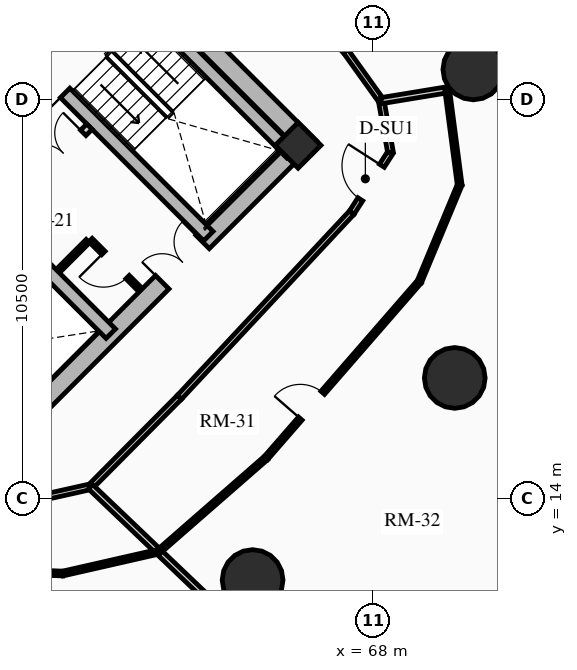
"""IFC4 building model, lengths in metres.
Left out: names, types, materials, properties, quantities, classifications, styles, units other than length and angle.
Written with IfcOpenShell. Run it as: python <this file> out.ifc"""

import sys

from ifc_helpers import new_model, si_unit, direction, frame, frame_2d, origin, origin_2d, place, context, subcontext, project, spatial, rectangle, circle, extrude, source, transform, mapped, element, fill, save


model = new_model("IFC4")
c1 = context("Model", 3, precision=1e-05, world=origin(), true_north=direction((0.0, 1.0)))
c2 = subcontext(c1, "Body", "Model", "MODEL_VIEW")
j1 = project(units=[si_unit("LENGTHUNIT", "METRE"), si_unit("PLANEANGLEUNIT", "RADIAN")], contexts=[c1])
p1 = place(None, origin())
s1 = spatial("IfcSite", under=j1, at=p1, CompositionType="ELEMENT")
p2 = place(p1, origin())
s2 = spatial("IfcBuilding", under=s1, at=p2, CompositionType="ELEMENT")
p3 = place(p2, frame((0.0, 0.0, 56.92)))
s3 = spatial("IfcBuildingStorey", under=s2, at=p3, CompositionType="ELEMENT", Elevation=56.92)
p4 = place(p3, frame((66.339, 23.227, 0.0), z_axis=(0.0, 0.0, 1.0), x_axis=(-0.707106781187, 0.707106781187, 0.0)))
e1 = element("IfcWall", 1, at=p4, inside=s3, PredefinedType="SHEAR", context=c2, shape_type="SweptSolid", body=[
    extrude(rectangle(XDim=14.3, YDim=0.5, at=frame_2d((7.15, 0.0))), origin(), (0.0, 0.0, 1.0), 2.91),
])
p5 = place(p3, frame((58.596, 15.838, 0.0), z_axis=(0.0, 0.0, 1.0), x_axis=(0.707106781187, 0.707106781187, 0.0)))
e2 = element("IfcWall", 2, at=p5, inside=s3, PredefinedType="SHEAR", context=c2, shape_type="SweptSolid", body=[
    extrude(rectangle(XDim=10.7, YDim=0.5, at=frame_2d((5.35, 0.0))), origin(), (0.0, 0.0, 1.0), 2.91),
])
m1 = source(origin(), c2, "Body", "SweptSolid", [
    extrude(rectangle(XDim=1.5, YDim=2.02, at=frame_2d((0.75, 1.01))), frame((0.0, 0.26, 0.0), z_axis=(0.0, -1.0, 0.0), x_axis=(1.0, 0.0, 0.0)), (0.0, 0.0, 1.0), 0.52),
])
p6 = place(p5, frame((5.45, 0.0, 0.0)))
e3 = element("IfcOpeningElement", 3, at=p6, cuts=e2, PredefinedType="OPENING", context=c2, shape_type="MappedRepresentation", body=[
    mapped(m1, transform((0.0, 0.0, 0.0), x_axis=(1.0, 0.0, 0.0), y_axis=(0.0, 1.0, 0.0), z_axis=(0.0, 0.0, 1.0), scale=1.0)),
])
p7 = place(p3, frame((61.096, 18.338, 0.0), z_axis=(0.0, 0.0, 1.0), x_axis=(-0.707106781187, 0.707106781187, 0.0)))
e4 = element("IfcWall", 4, at=p7, inside=s3, PredefinedType="SHEAR", context=c2, shape_type="SweptSolid", body=[
    extrude(rectangle(XDim=13.8, YDim=0.35, at=frame_2d((6.9, 0.0))), origin(), (0.0, 0.0, 1.0), 2.91),
])
m2 = source(origin(), c2, "Body", "SweptSolid", [
    extrude(rectangle(XDim=1.1, YDim=2.015, at=frame_2d((0.55, 1.007))), frame((0.0, 0.185, 0.0), z_axis=(0.0, -1.0, 0.0), x_axis=(1.0, 0.0, 0.0)), (0.0, 0.0, 1.0), 0.37),
])
p8 = place(p7, frame((4.9, 0.0, 0.0)))
e5 = element("IfcOpeningElement", 5, at=p8, cuts=e4, PredefinedType="OPENING", context=c2, shape_type="MappedRepresentation", body=[
    mapped(m2, transform((0.0, 0.0, 0.0), x_axis=(1.0, 0.0, 0.0), y_axis=(0.0, 1.0, 0.0), z_axis=(0.0, 0.0, 1.0), scale=1.0)),
])
m3 = source(origin(), c2, "Body", "SweptSolid", [
    extrude(rectangle(XDim=1.15, YDim=2.02, at=frame_2d((0.575, 1.01))), frame((0.0, 0.185, 0.0), z_axis=(0.0, -1.0, 0.0), x_axis=(1.0, 0.0, 0.0)), (0.0, 0.0, 1.0), 0.37),
])
p9 = place(p7, frame((7.32, 0.0, 0.0)))
e6 = element("IfcOpeningElement", 6, at=p9, cuts=e4, PredefinedType="OPENING", context=c2, shape_type="MappedRepresentation", body=[
    mapped(m3, transform((0.0, 0.0, 0.0), x_axis=(1.0, 0.0, 0.0), y_axis=(0.0, 1.0, 0.0), z_axis=(0.0, 0.0, 1.0), scale=1.0)),
])
p10 = place(p3, frame((63.662, 20.904, 0.0), z_axis=(0.0, 0.0, 1.0), x_axis=(-0.707106781187, 0.707106781187, 0.0)))
e7 = element("IfcWall", 7, at=p10, inside=s3, PredefinedType="SHEAR", context=c2, shape_type="SweptSolid", body=[
    extrude(rectangle(XDim=13.8, YDim=0.35, at=frame_2d((6.9, 0.0))), origin(), (0.0, 0.0, 1.0), 2.91),
])
p11 = place(p10, frame((10.025, 0.0, 0.0)))
e8 = element("IfcOpeningElement", 8, at=p11, cuts=e7, PredefinedType="OPENING", context=c2, shape_type="MappedRepresentation", body=[
    mapped(m2, transform((0.0, 0.0, 0.0), x_axis=(1.0, 0.0, 0.0), y_axis=(0.0, 1.0, 0.0), z_axis=(0.0, 0.0, 1.0), scale=1.0)),
])
p12 = place(p10, frame((12.025, 0.0, 0.0)))
e9 = element("IfcOpeningElement", 9, at=p12, cuts=e7, PredefinedType="OPENING", context=c2, shape_type="MappedRepresentation", body=[
    mapped(m2, transform((0.0, 0.0, 0.0), x_axis=(1.0, 0.0, 0.0), y_axis=(0.0, 1.0, 0.0), z_axis=(0.0, 0.0, 1.0), scale=1.0)),
])
p13 = place(p10, frame((5.33, 0.0, 0.0)))
e10 = element("IfcOpeningElement", 10, at=p13, cuts=e7, PredefinedType="OPENING", context=c2, shape_type="MappedRepresentation", body=[
    mapped(m3, transform((0.0, 0.0, 0.0), x_axis=(1.0, 0.0, 0.0), y_axis=(0.0, 1.0, 0.0), z_axis=(0.0, 0.0, 1.0), scale=1.0)),
])
p14 = place(p3, frame((65.847, 23.089, 0.0), z_axis=(0.0, 0.0, 1.0), x_axis=(-0.707106781187, 0.707106781187, 0.0)))
e11 = element("IfcWall", 11, at=p14, inside=s3, PredefinedType="SHEAR", context=c2, shape_type="SweptSolid", body=[
    extrude(rectangle(XDim=6.745, YDim=0.35, at=frame_2d((3.373, 0.0))), origin(), (0.0, 0.0, 1.0), 2.91),
])
p15 = place(p3, frame((58.893, 25.674, 0.0), z_axis=(0.0, 0.0, 1.0), x_axis=(0.707106781187, 0.707106781187, 0.0)))
e12 = element("IfcWall", 12, at=p15, inside=s3, PredefinedType="SHEAR", context=c2, shape_type="SweptSolid", body=[
    extrude(rectangle(XDim=3.285, YDim=0.35, at=frame_2d((1.643, 0.0))), origin(), (0.0, 0.0, 1.0), 2.91),
])
p16 = place(p3, frame((66.024, 23.294, 0.0), z_axis=(0.0, 0.0, 1.0), x_axis=(0.707106781187, 0.707106781187, 0.0)))
e13 = element("IfcColumn", 13, at=p16, inside=s3, PredefinedType="COLUMN", context=c2, shape_type="SweptSolid", body=[
    extrude(rectangle(XDim=0.85, YDim=0.85, at=origin_2d()), origin(), (0.0, 0.0, 1.0), 2.91),
])
for number, where, z_axis, x_axis in (
    (14, (64.827, 11.854, 0.0), (0.0, 0.0, 1.0), (1.0, 0.0, 0.0)),
    (15, (70.146, 17.173, 0.0), (0.0, 0.0, 1.0), (1.0, 0.0, 0.0)),
    (16, (70.635, 25.291, 0.0), (0.0, 0.0, 1.0), (1.0, 0.0, 0.0)),
):
    element("IfcColumn", number, at=place(p3, frame(where, z_axis=z_axis, x_axis=x_axis)), inside=s3, PredefinedType="USERDEFINED", context=c2, shape_type="SweptSolid", body=[
        extrude(circle(Radius=0.8, at=origin_2d()), origin(), (0.0, 0.0, 1.0), 2.91),
    ])
p17 = place(p3, frame((73.814, 15.031, 0.0), z_axis=(0.0, 0.0, 1.0), x_axis=(-0.559638693991, -0.828736708604, 0.0)))
e17 = element("IfcWall", 17, at=p17, inside=s3, PredefinedType="SOLIDWALL", context=c2, shape_type="SweptSolid", body=[
    extrude(rectangle(XDim=4.93, YDim=0.24, at=frame_2d((2.465, 0.0))), origin(), (0.0, 0.0, 1.0), 2.073),
])
m4 = source(origin(), c2, "Body", "SweptSolid", [
    extrude(rectangle(XDim=1.9, YDim=1.35, at=frame_2d((0.95, 0.675))), frame((0.0, 0.13, 0.0), z_axis=(0.0, -1.0, 0.0), x_axis=(1.0, 0.0, 0.0)), (0.0, 0.0, 1.0), 0.26),
])
p18 = place(p17, frame((1.515, 0.0, 0.65)))
e18 = element("IfcOpeningElement", 18, at=p18, cuts=e17, PredefinedType="OPENING", context=c2, shape_type="MappedRepresentation", body=[
    mapped(m4, transform((0.0, 0.0, 0.0), x_axis=(1.0, 0.0, 0.0), y_axis=(0.0, 1.0, 0.0), z_axis=(0.0, 0.0, 1.0), scale=1.0)),
])
p19 = place(p3, frame((58.214, 21.467, 0.0), z_axis=(0.0, 0.0, 1.0), x_axis=(0.707106781187, 0.707106781187, 0.0)))
e19 = element("IfcWall", 19, at=p19, inside=s3, PredefinedType="PARTITIONING", context=c2, shape_type="SweptSolid", body=[
    extrude(rectangle(XDim=3.28, YDim=0.2, at=frame_2d((1.64, 0.0))), origin(), (0.0, 0.0, 1.0), 2.635),
])
m5 = source(origin(), c2, "Body", "SweptSolid", [
    extrude(rectangle(XDim=1.5, YDim=2.02, at=frame_2d((0.75, 1.01))), frame((0.0, 0.11, 0.0), z_axis=(0.0, -1.0, 0.0), x_axis=(1.0, 0.0, 0.0)), (0.0, 0.0, 1.0), 0.22),
])
p20 = place(p19, frame((1.55, 0.0, 0.0)))
e20 = element("IfcOpeningElement", 20, at=p20, cuts=e19, PredefinedType="OPENING", context=c2, shape_type="MappedRepresentation", body=[
    mapped(m5, transform((0.0, 0.0, 0.0), x_axis=(1.0, 0.0, 0.0), y_axis=(0.0, 1.0, 0.0), z_axis=(0.0, 0.0, 1.0), scale=1.0)),
])
p21 = place(p3, frame((61.835, 19.529, 0.0), z_axis=(0.0, 0.0, 1.0), x_axis=(-0.707174592913, 0.707038962956, 0.0)))
e21 = element("IfcWall", 21, at=p21, inside=s3, PredefinedType="PARTITIONING", context=c2, shape_type="SweptSolid", body=[
    extrude(rectangle(XDim=1.8, YDim=0.125, at=frame_2d((0.9, 0.0))), origin(), (0.0, 0.0, 1.0), 2.635),
])
m6 = source(origin(), c2, "Body", "SweptSolid", [
    extrude(rectangle(XDim=0.9, YDim=2.005, at=frame_2d((0.45, 1.002))), frame((0.0, 0.073, 0.0), z_axis=(0.0, -1.0, 0.0), x_axis=(1.0, 0.0, 0.0)), (0.0, 0.0, 1.0), 0.145),
])
p22 = place(p21, frame((0.42, 0.0, 0.0)))
e22 = element("IfcOpeningElement", 22, at=p22, cuts=e21, PredefinedType="OPENING", context=c2, shape_type="MappedRepresentation", body=[
    mapped(m6, transform((0.0, 0.0, 0.0), x_axis=(1.0, 0.0, 0.0), y_axis=(0.0, 1.0, 0.0), z_axis=(0.0, 0.0, 1.0), scale=1.0)),
])
p23 = place(p3, frame((59.713, 19.996, 0.0), z_axis=(0.0, 0.0, 1.0), x_axis=(0.707217726, 0.706995818963, 0.0)))
e23 = element("IfcWall", 23, at=p23, inside=s3, PredefinedType="PARTITIONING", context=c2, shape_type="SweptSolid", body=[
    extrude(rectangle(XDim=1.1, YDim=0.125, at=frame_2d((0.55, 0.0))), origin(), (0.0, 0.0, 1.0), 2.635),
])
p24 = place(p3, frame((59.008, 13.963, 0.0), z_axis=(0.0, 0.0, 1.0), x_axis=(0.976020856791, 0.21767702476, 0.0)))
e24 = element("IfcWall", 24, at=p24, inside=s3, PredefinedType="PARTITIONING", context=c2, shape_type="SweptSolid", body=[
    extrude(rectangle(XDim=1.593, YDim=0.15, at=frame_2d((0.796, 0.0))), origin(), (0.0, 0.0, 1.0), 2.205),
])
p25 = place(p3, frame((60.562, 14.31, 0.0), z_axis=(0.0, 0.0, 1.0), x_axis=(0.704566236161, 0.709638230975, 0.0)))
e25 = element("IfcWall", 25, at=p25, inside=s3, PredefinedType="PARTITIONING", context=c2, shape_type="SweptSolid", body=[
    extrude(rectangle(XDim=3.321, YDim=0.15, at=frame_2d((1.661, 0.0))), origin(), (0.0, 0.0, 1.0), 2.159),
])
p26 = place(p3, frame((62.903, 16.667, 0.0), z_axis=(0.0, 0.0, 1.0), x_axis=(0.682371947497, 0.731005147225, 0.0)))
e26 = element("IfcWall", 26, at=p26, inside=s3, PredefinedType="PARTITIONING", context=c2, shape_type="SweptSolid", body=[
    extrude(rectangle(XDim=6.642, YDim=0.15, at=frame_2d((3.321, 0.0))), origin(), (0.0, 0.0, 1.0), 2.159),
])
p27 = place(p3, frame((67.435, 21.521, 0.0), z_axis=(0.0, 0.0, 1.0), x_axis=(0.540777197838, 0.841165870859, 0.0)))
e27 = element("IfcWall", 27, at=p27, inside=s3, PredefinedType="PARTITIONING", context=c2, shape_type="SweptSolid", body=[
    extrude(rectangle(XDim=1.888, YDim=0.15, at=frame_2d((0.944, 0.0))), origin(), (0.0, 0.0, 1.0), 2.205),
])
m7 = source(origin(), c2, "Body", "SweptSolid", [
    extrude(rectangle(XDim=1.05, YDim=2.015, at=frame_2d((0.525, 1.007))), frame((0.0, 0.085, 0.0), z_axis=(0.0, -1.0, 0.0), x_axis=(1.0, 0.0, 0.0)), (0.0, 0.0, 1.0), 0.17),
])
p28 = place(p27, frame((0.419, 0.0, 0.0)))
e28 = element("IfcOpeningElement", 28, at=p28, cuts=e27, PredefinedType="OPENING", context=c2, shape_type="MappedRepresentation", body=[
    mapped(m7, transform((0.0, 0.0, 0.0), x_axis=(1.0, 0.0, 0.0), y_axis=(0.0, 1.0, 0.0), z_axis=(0.0, 0.0, 1.0), scale=1.0)),
])
p29 = place(p3, frame((68.456, 23.11, 0.0), z_axis=(0.0, 0.0, 1.0), x_axis=(-0.1772522795, 0.984165448191, 0.0)))
e29 = element("IfcWall", 29, at=p29, inside=s3, PredefinedType="PARTITIONING", context=c2, shape_type="SweptSolid", body=[
    extrude(rectangle(XDim=1.382, YDim=0.15, at=frame_2d((0.691, 0.0))), origin(), (0.0, 0.0, 1.0), 2.159),
])
p30 = place(p3, frame((68.211, 24.469, 0.0), z_axis=(0.0, 0.0, 1.0), x_axis=(-0.583012141368, 0.812463441034, 0.0)))
e30 = element("IfcWall", 30, at=p30, inside=s3, PredefinedType="PARTITIONING", context=c2, shape_type="SweptSolid", body=[
    extrude(rectangle(XDim=1.613, YDim=0.15, at=frame_2d((0.807, 0.0))), origin(), (0.0, 0.0, 1.0), 2.205),
])
p31 = place(p3, frame((67.27, 25.78, 0.0), z_axis=(0.0, 0.0, 1.0), x_axis=(-0.696847842907, 0.717218992942, 0.0)))
e31 = element("IfcWall", 31, at=p31, inside=s3, PredefinedType="PARTITIONING", context=c2, shape_type="SweptSolid", body=[
    extrude(rectangle(XDim=6.004, YDim=0.15, at=frame_2d((3.002, 0.0))), origin(), (0.0, 0.0, 1.0), 2.635),
])
m8 = source(origin(), c2, "Body", "SweptSolid", [
    extrude(rectangle(XDim=1.0, YDim=2.015, at=frame_2d((0.5, 1.007))), frame((0.0, 0.085, 0.0), z_axis=(0.0, -1.0, 0.0), x_axis=(1.0, 0.0, 0.0)), (0.0, 0.0, 1.0), 0.17),
])
p32 = place(p31, frame((2.502, 0.0, 0.0)))
e32 = element("IfcOpeningElement", 32, at=p32, cuts=e31, PredefinedType="OPENING", context=c2, shape_type="MappedRepresentation", body=[
    mapped(m8, transform((0.0, 0.0, 0.0), x_axis=(1.0, 0.0, 0.0), y_axis=(0.0, 1.0, 0.0), z_axis=(0.0, 0.0, 1.0), scale=1.0)),
])
p33 = place(p3, frame((60.562, 14.31, 0.0), z_axis=(0.0, 0.0, 1.0), x_axis=(0.723408813637, -0.690419936236, 0.0)))
e33 = element("IfcWall", 33, at=p33, inside=s3, PredefinedType="PARTITIONING", context=c2, shape_type="SweptSolid", body=[
    extrude(rectangle(XDim=8.844, YDim=0.16, at=frame_2d((4.422, 0.0))), origin(), (0.0, 0.0, 1.0), 2.073),
])
p34 = place(p3, frame((68.211, 24.469, 0.0), z_axis=(0.0, 0.0, 1.0), x_axis=(0.986718695255, 0.162438346562, 0.0)))
e34 = element("IfcWall", 34, at=p34, inside=s3, PredefinedType="PARTITIONING", context=c2, shape_type="SweptSolid", body=[
    extrude(rectangle(XDim=6.281, YDim=0.16, at=frame_2d((3.141, 0.0))), origin(), (0.0, 0.0, 1.0), 2.073),
])
p35 = place(p3, frame((57.231, 12.131, 0.0), z_axis=(0.0, 0.0, 1.0), x_axis=(0.999171636131, -0.040694490436, 0.0)))
e35 = element("IfcWall", 35, at=p35, inside=s3, PredefinedType="PARTITIONING", context=c2, shape_type="SweptSolid", body=[
    extrude(rectangle(XDim=2.604, YDim=0.125, at=frame_2d((1.302, 0.0))), origin(), (0.0, 0.0, 1.0), 2.635),
])
p36 = place(p3, frame((59.833, 12.025, 0.0), z_axis=(0.0, 0.0, 1.0), x_axis=(0.975011214108, 0.222155648959, 0.0)))
e36 = element("IfcWall", 36, at=p36, inside=s3, PredefinedType="PARTITIONING", context=c2, shape_type="SweptSolid", body=[
    extrude(rectangle(XDim=2.586, YDim=0.125, at=frame_2d((1.293, 0.0))), origin(), (0.0, 0.0, 1.0), 2.205),
])
p37 = place(p3, frame((62.354, 12.6, 0.0), z_axis=(0.0, 0.0, 1.0), x_axis=(0.75329750535, 0.657679913357, 0.0)))
e37 = element("IfcWall", 37, at=p37, inside=s3, PredefinedType="PARTITIONING", context=c2, shape_type="SweptSolid", body=[
    extrude(rectangle(XDim=3.753, YDim=0.125, at=frame_2d((1.877, 0.0))), origin(), (0.0, 0.0, 1.0), 2.159),
])
p38 = place(p3, frame((65.181, 15.068, 0.0), z_axis=(0.0, 0.0, 1.0), x_axis=(0.656272116637, 0.754524293131, 0.0)))
e38 = element("IfcWall", 38, at=p38, inside=s3, PredefinedType="PARTITIONING", context=c2, shape_type="SweptSolid", body=[
    extrude(rectangle(XDim=6.147, YDim=0.125, at=frame_2d((3.074, 0.0))), origin(), (0.0, 0.0, 1.0), 2.159),
])
p39 = place(p38, frame((1.372, 0.0, 0.0)))
e39 = element("IfcOpeningElement", 39, at=p39, cuts=e38, PredefinedType="OPENING", context=c2, shape_type="MappedRepresentation", body=[
    mapped(m6, transform((0.0, 0.0, 0.0), x_axis=(1.0, 0.0, 0.0), y_axis=(0.0, 1.0, 0.0), z_axis=(0.0, 0.0, 1.0), scale=1.0)),
])
p40 = place(p3, frame((69.216, 19.707, 0.0), z_axis=(0.0, 0.0, 1.0), x_axis=(0.384483341888, 0.923131929797, 0.0)))
e40 = element("IfcWall", 40, at=p40, inside=s3, PredefinedType="PARTITIONING", context=c2, shape_type="SweptSolid", body=[
    extrude(rectangle(XDim=2.757, YDim=0.125, at=frame_2d((1.378, 0.0))), origin(), (0.0, 0.0, 1.0), 2.205),
])
p41 = place(p3, frame((70.276, 22.252, 0.0), z_axis=(0.0, 0.0, 1.0), x_axis=(-0.130649633398, 0.991428602217, 0.0)))
e41 = element("IfcWall", 41, at=p41, inside=s3, PredefinedType="PARTITIONING", context=c2, shape_type="SweptSolid", body=[
    extrude(rectangle(XDim=2.525, YDim=0.125, at=frame_2d((1.262, 0.0))), origin(), (0.0, 0.0, 1.0), 2.073),
])
m9 = source(origin(), c2, "Body", "SweptSolid", [
    extrude(rectangle(XDim=1.15, YDim=2.02, at=frame_2d((0.575, 1.01))), frame((0.0, 0.025, 0.0), z_axis=(0.0, -1.0, 0.0), x_axis=(1.0, 0.0, 0.0)), (0.0, 0.0, 1.0), 0.05),
])
p42 = place(p13, origin())
e42 = element("IfcDoor", 42, at=p42, inside=s3, OperationType="SINGLE_SWING_LEFT", PredefinedType="DOOR", context=c2, shape_type="MappedRepresentation", body=[
    mapped(m9, transform((0.0, 0.0, 0.0), x_axis=(1.0, 0.0, 0.0), y_axis=(0.0, 1.0, 0.0), z_axis=(0.0, 0.0, 1.0), scale=1.0)),
])
fill(e10, e42)
m10 = source(origin(), c2, "Body", "SweptSolid", [
    extrude(rectangle(XDim=1.5, YDim=2.02, at=frame_2d((0.75, 1.01))), frame((0.0, 0.025, 0.0), z_axis=(0.0, -1.0, 0.0), x_axis=(1.0, 0.0, 0.0)), (0.0, 0.0, 1.0), 0.05),
])
p43 = place(p6, origin())
e43 = element("IfcDoor", 43, at=p43, inside=s3, OperationType="DOUBLE_DOOR_SINGLE_SWING", PredefinedType="DOOR", context=c2, shape_type="MappedRepresentation", body=[
    mapped(m10, transform((0.0, 0.0, 0.0), x_axis=(1.0, 0.0, 0.0), y_axis=(0.0, 1.0, 0.0), z_axis=(0.0, 0.0, 1.0), scale=1.0)),
])
fill(e3, e43)
p44 = place(p20, origin())
e44 = element("IfcDoor", 44, at=p44, inside=s3, OperationType="DOUBLE_DOOR_SINGLE_SWING", PredefinedType="DOOR", context=c2, shape_type="MappedRepresentation", body=[
    mapped(m10, transform((0.0, 0.0, 0.0), x_axis=(1.0, 0.0, 0.0), y_axis=(0.0, 1.0, 0.0), z_axis=(0.0, 0.0, 1.0), scale=1.0)),
])
fill(e20, e44)
m11 = source(origin(), c2, "Body", "SweptSolid", [
    extrude(rectangle(XDim=0.9, YDim=2.005, at=frame_2d((0.45, 1.002))), frame((0.0, 0.025, 0.0), z_axis=(0.0, -1.0, 0.0), x_axis=(1.0, 0.0, 0.0)), (0.0, 0.0, 1.0), 0.05),
])
p45 = place(p22, origin())
e45 = element("IfcDoor", 45, at=p45, inside=s3, OperationType="SINGLE_SWING_RIGHT", PredefinedType="DOOR", context=c2, shape_type="MappedRepresentation", body=[
    mapped(m11, transform((0.0, 0.0, 0.0), x_axis=(1.0, 0.0, 0.0), y_axis=(0.0, 1.0, 0.0), z_axis=(0.0, 0.0, 1.0), scale=1.0)),
])
fill(e22, e45)
m12 = source(origin(), c2, "Body", "SweptSolid", [
    extrude(rectangle(XDim=1.05, YDim=2.015, at=frame_2d((0.525, 1.007))), frame((0.0, 0.025, 0.0), z_axis=(0.0, -1.0, 0.0), x_axis=(1.0, 0.0, 0.0)), (0.0, 0.0, 1.0), 0.05),
])
p46 = place(p28, origin())
e46 = element("IfcDoor", 46, at=p46, inside=s3, OperationType="SINGLE_SWING_RIGHT", PredefinedType="DOOR", context=c2, shape_type="MappedRepresentation", body=[
    mapped(m12, transform((0.0, 0.0, 0.0), x_axis=(1.0, 0.0, 0.0), y_axis=(0.0, 1.0, 0.0), z_axis=(0.0, 0.0, 1.0), scale=1.0)),
])
fill(e28, e46)
p47 = place(p39, origin())
e47 = element("IfcDoor", 47, at=p47, inside=s3, OperationType="SINGLE_SWING_LEFT", PredefinedType="DOOR", context=c2, shape_type="MappedRepresentation", body=[
    mapped(m11, transform((0.0, 0.0, 0.0), x_axis=(1.0, 0.0, 0.0), y_axis=(0.0, 1.0, 0.0), z_axis=(0.0, 0.0, 1.0), scale=1.0)),
])
fill(e39, e47)
save(model, sys.argv[1])
